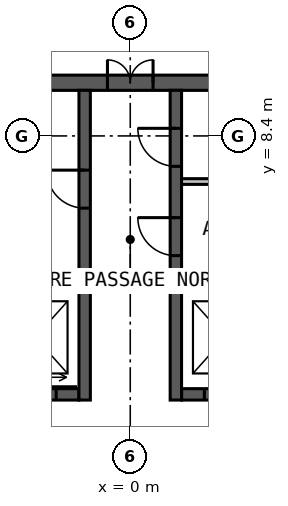
"""IFC4 building model, lengths in metres.
Left out: names, types, materials, properties, quantities, classifications, styles, units other than length and angle.
Written with IfcOpenShell. Run it as: python <this file> out.ifc"""

import sys

from ifc_helpers import new_model, si_unit, direction, frame, frame_2d, origin, place, context, subcontext, project, spatial, rectangle, extrude, element, fill, save


model = new_model("IFC4")
c1 = context("Model", 3, precision=1e-05, world=origin(), true_north=direction((0.0, 1.0)))
c2 = subcontext(c1, "Body", "Model", "MODEL_VIEW")
j1 = project(units=[si_unit("LENGTHUNIT", "METRE"), si_unit("PLANEANGLEUNIT", "RADIAN")], contexts=[c1])
p1 = place(None, origin())
s1 = spatial("IfcSite", under=j1, at=p1, CompositionType="ELEMENT")
p2 = place(p1, origin())
s2 = spatial("IfcBuilding", under=s1, at=p2, CompositionType="ELEMENT")
p3 = place(p2, frame((0.0, 0.0, 240.0)))
s3 = spatial("IfcBuildingStorey", under=s2, at=p3, CompositionType="ELEMENT", Elevation=240.0)
p4 = place(p3, frame((-10.0, 9.8, 0.0), z_axis=(0.0, 0.0, 1.0), x_axis=(1.0, 0.0, 0.0)))
e1 = element("IfcWall", 1, at=p4, inside=s3, PredefinedType="SOLIDWALL", context=c2, shape_type="SweptSolid", body=[
    extrude(rectangle(XDim=20.0, YDim=0.4, at=frame_2d((10.0, 0.0))), origin(), (0.0, 0.0, 1.0), 4.0),
])
p5 = place(p4, frame((9.4, 0.0, 0.0)))
e2 = element("IfcOpeningElement", 2, at=p5, cuts=e1, PredefinedType="OPENING", context=c2, shape_type="SweptSolid", body=[
    extrude(rectangle(XDim=1.2, YDim=2.2, at=frame_2d((0.6, 1.1))), frame((0.0, 0.21, 0.0), z_axis=(0.0, -1.0, 0.0), x_axis=(1.0, 0.0, 0.0)), (0.0, 0.0, 1.0), 0.42),
])
p6 = place(p3, frame((-6.2, 1.6, 0.0), z_axis=(0.0, 0.0, 1.0), x_axis=(1.0, 0.0, 0.0)))
e3 = element("IfcWall", 3, at=p6, inside=s3, PredefinedType="SOLIDWALL", context=c2, shape_type="SweptSolid", body=[
    extrude(rectangle(XDim=4.85, YDim=0.3, at=frame_2d((2.425, 0.0))), origin(), (0.0, 0.0, 1.0), 4.0),
])
p7 = place(p6, frame((0.625, 0.0, 0.0)))
e4 = element("IfcOpeningElement", 4, at=p7, cuts=e3, PredefinedType="OPENING", context=c2, shape_type="SweptSolid", body=[
    extrude(rectangle(XDim=1.1, YDim=2.2, at=frame_2d((0.55, 1.1))), frame((0.0, 0.16, 0.0), z_axis=(0.0, -1.0, 0.0), x_axis=(1.0, 0.0, 0.0)), (0.0, 0.0, 1.0), 0.32),
])
p8 = place(p6, frame((3.15, 0.0, 0.0)))
e5 = element("IfcOpeningElement", 5, at=p8, cuts=e3, PredefinedType="OPENING", context=c2, shape_type="SweptSolid", body=[
    extrude(rectangle(XDim=1.1, YDim=2.2, at=frame_2d((0.55, 1.1))), frame((0.0, 0.16, 0.0), z_axis=(0.0, -1.0, 0.0), x_axis=(1.0, 0.0, 0.0)), (0.0, 0.0, 1.0), 0.32),
])
p9 = place(p3, frame((1.35, 1.6, 0.0), z_axis=(0.0, 0.0, 1.0), x_axis=(1.0, 0.0, 0.0)))
e6 = element("IfcWall", 6, at=p9, inside=s3, PredefinedType="SOLIDWALL", context=c2, shape_type="SweptSolid", body=[
    extrude(rectangle(XDim=4.85, YDim=0.3, at=frame_2d((2.425, 0.0))), origin(), (0.0, 0.0, 1.0), 4.0),
])
p10 = place(p9, frame((0.6, 0.0, 0.0)))
e7 = element("IfcOpeningElement", 7, at=p10, cuts=e6, PredefinedType="OPENING", context=c2, shape_type="SweptSolid", body=[
    extrude(rectangle(XDim=1.1, YDim=2.2, at=frame_2d((0.55, 1.1))), frame((0.0, 0.16, 0.0), z_axis=(0.0, -1.0, 0.0), x_axis=(1.0, 0.0, 0.0)), (0.0, 0.0, 1.0), 0.32),
])
p11 = place(p9, frame((3.125, 0.0, 0.0)))
e8 = element("IfcOpeningElement", 8, at=p11, cuts=e6, PredefinedType="OPENING", context=c2, shape_type="SweptSolid", body=[
    extrude(rectangle(XDim=1.1, YDim=2.2, at=frame_2d((0.55, 1.1))), frame((0.0, 0.16, 0.0), z_axis=(0.0, -1.0, 0.0), x_axis=(1.0, 0.0, 0.0)), (0.0, 0.0, 1.0), 0.32),
])
for number, where, z_axis, x_axis in (
    (9, (-6.2, 4.6, 0.0), (0.0, 0.0, 1.0), (1.0, 0.0, 0.0)),
    (10, (1.35, 4.6, 0.0), (0.0, 0.0, 1.0), (1.0, 0.0, 0.0)),
):
    element("IfcWall", number, at=place(p3, frame(where, z_axis=z_axis, x_axis=x_axis)), inside=s3, PredefinedType="SOLIDWALL", context=c2, shape_type="SweptSolid", body=[
        extrude(rectangle(XDim=4.85, YDim=0.3, at=frame_2d((2.425, 0.0))), origin(), (0.0, 0.0, 1.0), 4.0),
    ])
p12 = place(p3, frame((-1.2, 1.45, 0.0), z_axis=(0.0, 0.0, 1.0), x_axis=(0.0, 1.0, 0.0)))
e11 = element("IfcWall", 11, at=p12, inside=s3, PredefinedType="SOLIDWALL", context=c2, shape_type="SweptSolid", body=[
    extrude(rectangle(XDim=8.15, YDim=0.3, at=frame_2d((4.075, 0.0))), origin(), (0.0, 0.0, 1.0), 4.0),
])
p13 = place(p12, frame((5.05, 0.0, 0.0)))
e12 = element("IfcOpeningElement", 12, at=p13, cuts=e11, PredefinedType="OPENING", context=c2, shape_type="SweptSolid", body=[
    extrude(rectangle(XDim=1.0, YDim=2.2, at=frame_2d((0.5, 1.1))), frame((0.0, 0.16, 0.0), z_axis=(0.0, -1.0, 0.0), x_axis=(1.0, 0.0, 0.0)), (0.0, 0.0, 1.0), 0.32),
])
p14 = place(p3, frame((1.2, 1.45, 0.0), z_axis=(0.0, 0.0, 1.0), x_axis=(0.0, 1.0, 0.0)))
e13 = element("IfcWall", 13, at=p14, inside=s3, PredefinedType="SOLIDWALL", context=c2, shape_type="SweptSolid", body=[
    extrude(rectangle(XDim=8.15, YDim=0.3, at=frame_2d((4.075, 0.0))), origin(), (0.0, 0.0, 1.0), 4.0),
])
p15 = place(p14, frame((3.8, 0.0, 0.0)))
e14 = element("IfcOpeningElement", 14, at=p15, cuts=e13, PredefinedType="OPENING", context=c2, shape_type="SweptSolid", body=[
    extrude(rectangle(XDim=1.0, YDim=2.2, at=frame_2d((0.5, 1.1))), frame((0.0, 0.16, 0.0), z_axis=(0.0, -1.0, 0.0), x_axis=(1.0, 0.0, 0.0)), (0.0, 0.0, 1.0), 0.32),
])
p16 = place(p14, frame((6.15, 0.0, 0.0)))
e15 = element("IfcOpeningElement", 15, at=p16, cuts=e13, PredefinedType="OPENING", context=c2, shape_type="SweptSolid", body=[
    extrude(rectangle(XDim=1.0, YDim=2.2, at=frame_2d((0.5, 1.1))), frame((0.0, 0.16, 0.0), z_axis=(0.0, -1.0, 0.0), x_axis=(1.0, 0.0, 0.0)), (0.0, 0.0, 1.0), 0.32),
])
p17 = place(p3, frame((1.35, 7.2, 0.0), z_axis=(0.0, 0.0, 1.0), x_axis=(1.0, 0.0, 0.0)))
e16 = element("IfcWall", 16, at=p17, inside=s3, PredefinedType="PARTITIONING", context=c2, shape_type="SweptSolid", body=[
    extrude(rectangle(XDim=4.85, YDim=0.15, at=frame_2d((2.425, 0.0))), origin(), (0.0, 0.0, 1.0), 3.75),
])
p18 = place(p17, frame((3.45, 0.0, 0.0)))
e17 = element("IfcOpeningElement", 17, at=p18, cuts=e16, PredefinedType="OPENING", context=c2, shape_type="SweptSolid", body=[
    extrude(rectangle(XDim=0.9, YDim=2.2, at=frame_2d((0.45, 1.1))), frame((0.0, 0.085, 0.0), z_axis=(0.0, -1.0, 0.0), x_axis=(1.0, 0.0, 0.0)), (0.0, 0.0, 1.0), 0.17),
])
p19 = place(p5, origin())
e18 = element("IfcDoor", 18, at=p19, inside=s3, OperationType="DOUBLE_DOOR_SINGLE_SWING", PredefinedType="DOOR", context=c2, shape_type="SweptSolid", body=[
    extrude(rectangle(XDim=1.2, YDim=2.2, at=frame_2d((0.6, 1.1))), frame((0.0, 0.025, 0.0), z_axis=(0.0, -1.0, 0.0), x_axis=(1.0, 0.0, 0.0)), (0.0, 0.0, 1.0), 0.05),
])
fill(e2, e18)
p20 = place(p13, origin())
e19 = element("IfcDoor", 19, at=p20, inside=s3, OperationType="SINGLE_SWING_RIGHT", PredefinedType="DOOR", context=c2, shape_type="SweptSolid", body=[
    extrude(rectangle(XDim=1.0, YDim=2.2, at=frame_2d((0.5, 1.1))), frame((0.0, 0.025, 0.0), z_axis=(0.0, -1.0, 0.0), x_axis=(1.0, 0.0, 0.0)), (0.0, 0.0, 1.0), 0.05),
])
fill(e12, e19)
p21 = place(p15, origin())
e20 = element("IfcDoor", 20, at=p21, inside=s3, OperationType="SINGLE_SWING_RIGHT", PredefinedType="DOOR", context=c2, shape_type="SweptSolid", body=[
    extrude(rectangle(XDim=1.0, YDim=2.2, at=frame_2d((0.5, 1.1))), frame((0.0, 0.025, 0.0), z_axis=(0.0, -1.0, 0.0), x_axis=(1.0, 0.0, 0.0)), (0.0, 0.0, 1.0), 0.05),
])
fill(e14, e20)
p22 = place(p16, origin())
e21 = element("IfcDoor", 21, at=p22, inside=s3, OperationType="SINGLE_SWING_RIGHT", PredefinedType="DOOR", context=c2, shape_type="SweptSolid", body=[
    extrude(rectangle(XDim=1.0, YDim=2.2, at=frame_2d((0.5, 1.1))), frame((0.0, 0.025, 0.0), z_axis=(0.0, -1.0, 0.0), x_axis=(1.0, 0.0, 0.0)), (0.0, 0.0, 1.0), 0.05),
])
fill(e15, e21)
p23 = place(p8, origin())
e22 = element("IfcDoor", 22, at=p23, inside=s3, OperationType="SLIDING_TO_LEFT", PredefinedType="DOOR", context=c2, shape_type="SweptSolid", body=[
    extrude(rectangle(XDim=1.1, YDim=2.2, at=frame_2d((0.55, 1.1))), frame((0.0, 0.025, 0.0), z_axis=(0.0, -1.0, 0.0), x_axis=(1.0, 0.0, 0.0)), (0.0, 0.0, 1.0), 0.05),
])
fill(e5, e22)
p24 = place(p10, origin())
e23 = element("IfcDoor", 23, at=p24, inside=s3, OperationType="SLIDING_TO_LEFT", PredefinedType="DOOR", context=c2, shape_type="SweptSolid", body=[
    extrude(rectangle(XDim=1.1, YDim=2.2, at=frame_2d((0.55, 1.1))), frame((0.0, 0.025, 0.0), z_axis=(0.0, -1.0, 0.0), x_axis=(1.0, 0.0, 0.0)), (0.0, 0.0, 1.0), 0.05),
])
fill(e7, e23)
save(model, sys.argv[1])
